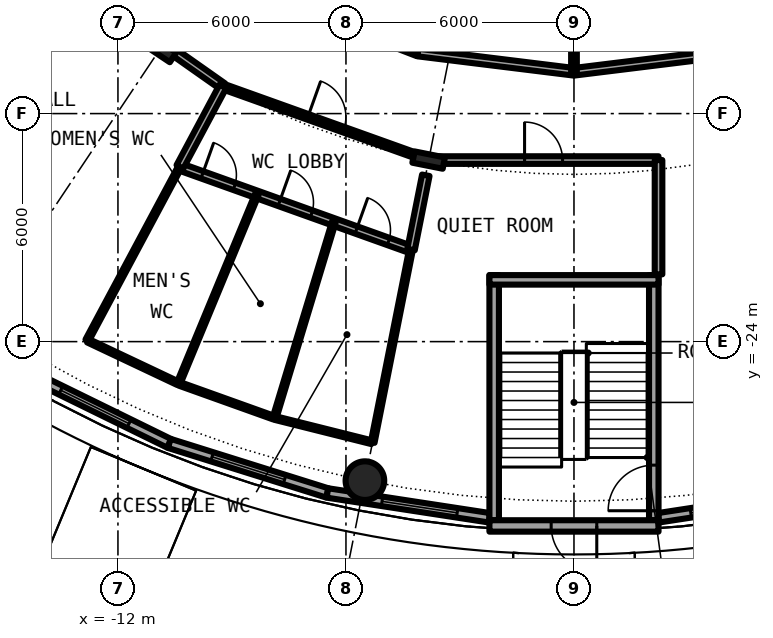
"""IFC4 building model, lengths in metres.
Left out: names, types, materials, properties, quantities, classifications, styles, units other than length and angle.
Written with IfcOpenShell. Run it as: python <this file> out.ifc"""

import sys

from ifc_helpers import new_model, si_unit, direction, frame, frame_2d, origin, origin_2d, place, context, subcontext, project, spatial, rectangle, hollow_circle, i_section, extrude, element, fill, save


model = new_model("IFC4")
c1 = context("Model", 3, precision=1e-05, world=origin(), true_north=direction((0.0, 1.0)))
c2 = subcontext(c1, "Body", "Model", "MODEL_VIEW")
j1 = project(units=[si_unit("LENGTHUNIT", "METRE"), si_unit("PLANEANGLEUNIT", "RADIAN")], contexts=[c1])
p1 = place(None, origin())
s1 = spatial("IfcSite", under=j1, at=p1, CompositionType="ELEMENT")
p2 = place(p1, origin())
s2 = spatial("IfcBuilding", under=s1, at=p2, CompositionType="ELEMENT")
p3 = place(p2, frame((0.0, 0.0, 9.6)))
s3 = spatial("IfcBuildingStorey", under=s2, at=p3, CompositionType="ELEMENT", Elevation=9.6)
p4 = place(p3, frame((-5.501, -27.658, 0.0), z_axis=(0.0, 0.0, 1.0), x_axis=(1.0, 0.0, 0.0)))
e1 = element("IfcColumn", 1, at=p4, inside=s3, PredefinedType="COLUMN", context=c2, shape_type="SweptSolid", body=[
    extrude(hollow_circle(Radius=0.508, WallThickness=0.05, at=origin_2d()), origin(), (0.0, 0.0, 1.0), 4.5),
])
for number, where, z_axis, x_axis in (
    (2, (-10.889, -16.297, 0.0), (0.0, 0.0, 1.0), (-0.556, -0.831, 0.0)),
    (3, (-3.824, -19.223, 0.0), (0.0, 0.0, 1.0), (-0.195, -0.981, 0.0)),
):
    element("IfcColumn", number, at=place(p3, frame(where, z_axis=z_axis, x_axis=x_axis)), inside=s3, PredefinedType="COLUMN", context=c2, shape_type="SweptSolid", body=[
        extrude(i_section(OverallWidth=0.303, OverallDepth=0.814, WebThickness=0.021, FlangeThickness=0.04, FilletRadius=0.03, at=origin_2d()), origin(), (0.0, 0.0, 1.0), 4.5),
    ])
p5 = place(p3, frame((-14.564, -24.759, 0.0), z_axis=(0.0, 0.0, 1.0), x_axis=(0.897938079481, -0.440121807478, 0.0)))
e4 = element("IfcWall", 4, at=p5, inside=s3, PredefinedType="SOLIDWALL", context=c2, shape_type="SweptSolid", body=[
    extrude(rectangle(XDim=4.36, YDim=0.25, at=frame_2d((2.18, 0.0))), origin(), (0.0, 0.0, 1.0), 4.05),
])
p6 = place(p5, frame((1.18, 0.0, 0.9)))
e5 = element("IfcOpeningElement", 5, at=p6, cuts=e4, PredefinedType="OPENING", context=c2, shape_type="SweptSolid", body=[
    extrude(rectangle(XDim=2.0, YDim=2.4, at=frame_2d((1.0, 1.2))), frame((0.0, 0.135, 0.0), z_axis=(0.0, -1.0, 0.0), x_axis=(1.0, 0.0, 0.0)), (0.0, 0.0, 1.0), 0.27),
])
p7 = place(p3, frame((-10.649, -26.678, 0.0), z_axis=(0.0, 0.0, 1.0), x_axis=(0.954219534331, -0.299107138498, 0.0)))
e6 = element("IfcWall", 6, at=p7, inside=s3, PredefinedType="SOLIDWALL", context=c2, shape_type="SweptSolid", body=[
    extrude(rectangle(XDim=4.359, YDim=0.25, at=frame_2d((2.18, 0.0))), origin(), (0.0, 0.0, 1.0), 4.05),
])
p8 = place(p7, frame((1.18, 0.0, 0.9)))
e7 = element("IfcOpeningElement", 7, at=p8, cuts=e6, PredefinedType="OPENING", context=c2, shape_type="SweptSolid", body=[
    extrude(rectangle(XDim=2.0, YDim=2.4, at=frame_2d((1.0, 1.2))), frame((0.0, 0.135, 0.0), z_axis=(0.0, -1.0, 0.0), x_axis=(1.0, 0.0, 0.0)), (0.0, 0.0, 1.0), 0.27),
])
p9 = place(p3, frame((-6.489, -27.982, 0.0), z_axis=(0.0, 0.0, 1.0), x_axis=(0.988472895049, -0.151397938406, 0.0)))
e8 = element("IfcWall", 8, at=p9, inside=s3, PredefinedType="SOLIDWALL", context=c2, shape_type="SweptSolid", body=[
    extrude(rectangle(XDim=4.314, YDim=0.25, at=frame_2d((2.157, 0.0))), origin(), (0.0, 0.0, 1.0), 4.05),
])
p10 = place(p9, frame((1.455, 0.0, 0.9)))
e9 = element("IfcOpeningElement", 9, at=p10, cuts=e8, PredefinedType="OPENING", context=c2, shape_type="SweptSolid", body=[
    extrude(rectangle(XDim=2.0, YDim=2.4, at=frame_2d((1.0, 1.2))), frame((0.0, 0.135, 0.0), z_axis=(0.0, -1.0, 0.0), x_axis=(1.0, 0.0, 0.0)), (0.0, 0.0, 1.0), 0.27),
])
p11 = place(p3, frame((2.225, -28.635, 0.0), z_axis=(0.0, 0.0, 1.0), x_axis=(0.988472895049, 0.151397938406, 0.0)))
e10 = element("IfcWall", 10, at=p11, inside=s3, PredefinedType="SOLIDWALL", context=c2, shape_type="SweptSolid", body=[
    extrude(rectangle(XDim=4.314, YDim=0.25, at=frame_2d((2.157, 0.0))), origin(), (0.0, 0.0, 1.0), 4.05),
])
p12 = place(p11, frame((0.859, 0.0, 0.9)))
e11 = element("IfcOpeningElement", 11, at=p12, cuts=e10, PredefinedType="OPENING", context=c2, shape_type="SweptSolid", body=[
    extrude(rectangle(XDim=2.0, YDim=2.4, at=frame_2d((1.0, 1.2))), frame((0.0, 0.135, 0.0), z_axis=(0.0, -1.0, 0.0), x_axis=(1.0, 0.0, 0.0)), (0.0, 0.0, 1.0), 0.27),
])
p13 = place(p3, frame((2.1, -28.7, 0.0), z_axis=(0.0, 0.0, 1.0), x_axis=(0.0, 1.0, 0.0)))
e12 = element("IfcWall", 12, at=p13, inside=s3, PredefinedType="SHEAR", context=c2, shape_type="SweptSolid", body=[
    extrude(rectangle(XDim=6.45, YDim=0.25, at=frame_2d((3.225, 0.0))), origin(), (0.0, 0.0, 1.0), 4.5),
])
p14 = place(p13, frame((0.25, 0.0, 0.0)))
e13 = element("IfcOpeningElement", 13, at=p14, cuts=e12, PredefinedType="OPENING", context=c2, shape_type="SweptSolid", body=[
    extrude(rectangle(XDim=1.2, YDim=2.3, at=frame_2d((0.6, 1.15))), frame((0.0, 0.135, 0.0), z_axis=(0.0, -1.0, 0.0), x_axis=(1.0, 0.0, 0.0)), (0.0, 0.0, 1.0), 0.27),
])
p15 = place(p3, frame((-2.1, -22.25, 0.0), z_axis=(0.0, 0.0, 1.0), x_axis=(0.0, -1.0, 0.0)))
e14 = element("IfcWall", 14, at=p15, inside=s3, PredefinedType="SHEAR", context=c2, shape_type="SweptSolid", body=[
    extrude(rectangle(XDim=6.45, YDim=0.25, at=frame_2d((3.225, 0.0))), origin(), (0.0, 0.0, 1.0), 4.5),
])
p16 = place(p3, frame((-2.225, -22.375, 0.0), z_axis=(0.0, 0.0, 1.0), x_axis=(1.0, 0.0, 0.0)))
e15 = element("IfcWall", 15, at=p16, inside=s3, PredefinedType="SHEAR", context=c2, shape_type="SweptSolid", body=[
    extrude(rectangle(XDim=4.45, YDim=0.25, at=frame_2d((2.225, 0.0))), origin(), (0.0, 0.0, 1.0), 4.5),
])
p17 = place(p3, frame((2.225, -28.85, 0.0), z_axis=(0.0, 0.0, 1.0), x_axis=(-1.0, 0.0, 0.0)))
e16 = element("IfcWall", 16, at=p17, inside=s3, PredefinedType="SHEAR", context=c2, shape_type="SweptSolid", body=[
    extrude(rectangle(XDim=4.45, YDim=0.3, at=frame_2d((2.225, 0.0))), origin(), (0.0, 0.0, 1.0), 4.5),
])
p18 = place(p17, frame((1.625, 0.0, 0.0)))
e17 = element("IfcOpeningElement", 17, at=p18, cuts=e16, PredefinedType="OPENING", context=c2, shape_type="SweptSolid", body=[
    extrude(rectangle(XDim=1.2, YDim=2.3, at=frame_2d((0.6, 1.15))), frame((0.0, 0.16, 0.0), z_axis=(0.0, -1.0, 0.0), x_axis=(1.0, 0.0, 0.0)), (0.0, 0.0, 1.0), 0.32),
])
p19 = place(p3, frame((-10.373, -19.401, 0.0), z_axis=(0.0, 0.0, 1.0), x_axis=(0.941534771306, -0.336915826909, 0.0)))
e18 = element("IfcWall", 18, at=p19, inside=s3, PredefinedType="PARTITIONING", context=c2, shape_type="SweptSolid", body=[
    extrude(rectangle(XDim=6.459, YDim=0.2, at=frame_2d((3.229, 0.0))), origin(), (0.0, 0.0, 1.0), 4.05),
])
p20 = place(p19, frame((0.627, 0.0, 0.0)))
e19 = element("IfcOpeningElement", 19, at=p20, cuts=e18, PredefinedType="OPENING", context=c2, shape_type="SweptSolid", body=[
    extrude(rectangle(XDim=0.9, YDim=2.3, at=frame_2d((0.45, 1.15))), frame((0.0, 0.11, 0.0), z_axis=(0.0, -1.0, 0.0), x_axis=(1.0, 0.0, 0.0)), (0.0, 0.0, 1.0), 0.22),
])
p21 = place(p19, frame((2.781, 0.0, 0.0)))
e20 = element("IfcOpeningElement", 20, at=p21, cuts=e18, PredefinedType="OPENING", context=c2, shape_type="SweptSolid", body=[
    extrude(rectangle(XDim=0.9, YDim=2.3, at=frame_2d((0.45, 1.15))), frame((0.0, 0.11, 0.0), z_axis=(0.0, -1.0, 0.0), x_axis=(1.0, 0.0, 0.0)), (0.0, 0.0, 1.0), 0.22),
])
p22 = place(p19, frame((4.933, 0.0, 0.0)))
e21 = element("IfcOpeningElement", 21, at=p22, cuts=e18, PredefinedType="OPENING", context=c2, shape_type="SweptSolid", body=[
    extrude(rectangle(XDim=0.9, YDim=2.3, at=frame_2d((0.45, 1.15))), frame((0.0, 0.11, 0.0), z_axis=(0.0, -1.0, 0.0), x_axis=(1.0, 0.0, 0.0)), (0.0, 0.0, 1.0), 0.22),
])
p23 = place(p3, frame((-10.687, -16.267, 0.0), z_axis=(0.0, 0.0, 1.0), x_axis=(0.817849682833, -0.575431921508, 0.0)))
e22 = element("IfcWall", 22, at=p23, inside=s3, PredefinedType="PARTITIONING", context=c2, shape_type="SweptSolid", body=[
    extrude(rectangle(XDim=1.771, YDim=0.2, at=frame_2d((0.885, 0.0))), origin(), (0.0, 0.0, 1.0), 3.63),
])
p24 = place(p3, frame((-9.239, -17.286, 0.0), z_axis=(0.0, 0.0, 1.0), x_axis=(0.941530584678, -0.336927526504, 0.0)))
e23 = element("IfcWall", 23, at=p24, inside=s3, PredefinedType="PARTITIONING", context=c2, shape_type="SweptSolid", body=[
    extrude(rectangle(XDim=5.598, YDim=0.15, at=frame_2d((2.799, 0.0))), origin(), (0.0, 0.0, 1.0), 3.63),
])
p25 = place(p24, frame((2.376, 0.0, 0.0)))
e24 = element("IfcOpeningElement", 24, at=p25, cuts=e23, PredefinedType="OPENING", context=c2, shape_type="SweptSolid", body=[
    extrude(rectangle(XDim=1.0, YDim=2.3, at=frame_2d((0.5, 1.15))), frame((0.0, 0.085, 0.0), z_axis=(0.0, -1.0, 0.0), x_axis=(1.0, 0.0, 0.0)), (0.0, 0.0, 1.0), 0.17),
])
p26 = place(p3, frame((-3.669, -19.223, 0.0), z_axis=(0.0, 0.0, 1.0), x_axis=(1.0, 0.0, 0.0)))
e25 = element("IfcWall", 25, at=p26, inside=s3, PredefinedType="PARTITIONING", context=c2, shape_type="SweptSolid", body=[
    extrude(rectangle(XDim=5.894, YDim=0.2, at=frame_2d((2.947, 0.0))), origin(), (0.0, 0.0, 1.0), 3.63),
])
p27 = place(p26, frame((2.369, 0.0, 0.0)))
e26 = element("IfcOpeningElement", 26, at=p27, cuts=e25, PredefinedType="OPENING", context=c2, shape_type="SweptSolid", body=[
    extrude(rectangle(XDim=1.0, YDim=2.3, at=frame_2d((0.5, 1.15))), frame((0.0, 0.11, 0.0), z_axis=(0.0, -1.0, 0.0), x_axis=(1.0, 0.0, 0.0)), (0.0, 0.0, 1.0), 0.22),
])
p28 = place(p3, frame((-7.967, -14.904, 0.0), z_axis=(0.0, 0.0, 1.0), x_axis=(0.932943640288, -0.360022449363, 0.0)))
e27 = element("IfcWall", 27, at=p28, inside=s3, PredefinedType="PARTITIONING", context=c2, shape_type="SweptSolid", body=[
    extrude(rectangle(XDim=4.139, YDim=0.2, at=frame_2d((2.069, 0.0))), origin(), (0.0, 0.0, 1.0), 4.05),
])
p29 = place(p28, frame((1.569, 0.0, 0.0)))
e28 = element("IfcOpeningElement", 28, at=p29, cuts=e27, PredefinedType="OPENING", context=c2, shape_type="SweptSolid", body=[
    extrude(rectangle(XDim=1.0, YDim=2.3, at=frame_2d((0.5, 1.15))), frame((0.0, 0.11, 0.0), z_axis=(0.0, -1.0, 0.0), x_axis=(1.0, 0.0, 0.0)), (0.0, 0.0, 1.0), 0.22),
])
for number, where, z_axis, x_axis in (
    (29, (-4.106, -16.394, 0.0), (0.0, 0.0, 1.0), (0.992, -0.122, 0.0)),
    (30, (0.0, -16.9, 0.0), (0.0, 0.0, 1.0), (0.992, 0.122, 0.0)),
):
    element("IfcWall", number, at=place(p3, frame(where, z_axis=z_axis, x_axis=x_axis)), inside=s3, PredefinedType="PARTITIONING", context=c2, shape_type="SweptSolid", body=[
        extrude(rectangle(XDim=4.137, YDim=0.2, at=frame_2d((2.068, 0.0))), origin(), (0.0, 0.0, 1.0), 4.05),
    ])
p30 = place(p3, frame((2.225, -22.23, 0.0), z_axis=(0.0, 0.0, 1.0), x_axis=(0.0, 1.0, 0.0)))
e31 = element("IfcWall", 31, at=p30, inside=s3, PredefinedType="PARTITIONING", context=c2, shape_type="SweptSolid", body=[
    extrude(rectangle(XDim=3.007, YDim=0.2, at=frame_2d((1.503, 0.0))), origin(), (0.0, 0.0, 1.0), 4.05),
])
p31 = place(p3, frame((-12.81, -23.966, 0.0), z_axis=(0.0, 0.0, 1.0), x_axis=(0.471464572183, 0.88188500224, 0.0)))
e32 = element("IfcWall", 32, at=p31, inside=s3, PredefinedType="PARTITIONING", context=c2, shape_type="SweptSolid", body=[
    extrude(rectangle(XDim=5.175, YDim=0.1, at=frame_2d((2.588, 0.0))), origin(), (0.0, 0.0, 1.0), 4.05),
])
p32 = place(p3, frame((-10.407, -25.103, 0.0), z_axis=(0.0, 0.0, 1.0), x_axis=(0.382973519041, 0.923759321313, 0.0)))
e33 = element("IfcWall", 33, at=p32, inside=s3, PredefinedType="PARTITIONING", context=c2, shape_type="SweptSolid", body=[
    extrude(rectangle(XDim=5.387, YDim=0.1, at=frame_2d((2.693, 0.0))), origin(), (0.0, 0.0, 1.0), 4.05),
])
p33 = place(p3, frame((-10.37, -19.402, 0.0), z_axis=(0.0, 0.0, 1.0), x_axis=(0.471385457832, 0.881927293004, 0.0)))
e34 = element("IfcWall", 34, at=p33, inside=s3, PredefinedType="PARTITIONING", context=c2, shape_type="SweptSolid", body=[
    extrude(rectangle(XDim=2.399, YDim=0.2, at=frame_2d((1.2, 0.0))), origin(), (0.0, 0.0, 1.0), 4.05),
])
p34 = place(p3, frame((-7.88, -26.007, 0.0), z_axis=(0.0, 0.0, 1.0), x_axis=(0.289945753839, 0.957043081492, 0.0)))
e35 = element("IfcWall", 35, at=p34, inside=s3, PredefinedType="PARTITIONING", context=c2, shape_type="SweptSolid", body=[
    extrude(rectangle(XDim=5.386, YDim=0.1, at=frame_2d((2.693, 0.0))), origin(), (0.0, 0.0, 1.0), 4.05),
])
p35 = place(p3, frame((-5.297, -26.654, 0.0), z_axis=(0.0, 0.0, 1.0), x_axis=(0.194963902417, 0.980810418355, 0.0)))
e36 = element("IfcWall", 36, at=p35, inside=s3, PredefinedType="PARTITIONING", context=c2, shape_type="SweptSolid", body=[
    extrude(rectangle(XDim=5.176, YDim=0.1, at=frame_2d((2.588, 0.0))), origin(), (0.0, 0.0, 1.0), 4.05),
])
p36 = place(p3, frame((-4.288, -21.578, 0.0), z_axis=(0.0, 0.0, 1.0), x_axis=(0.195244514504, 0.98075459701, 0.0)))
e37 = element("IfcWall", 37, at=p36, inside=s3, PredefinedType="PARTITIONING", context=c2, shape_type="SweptSolid", body=[
    extrude(rectangle(XDim=1.993, YDim=0.2, at=frame_2d((0.997, 0.0))), origin(), (0.0, 0.0, 1.0), 4.05),
])
p37 = place(p3, frame((0.0, -16.9, 0.0), z_axis=(0.0, 0.0, 1.0), x_axis=(0.0, 1.0, 0.0)))
e38 = element("IfcWall", 38, at=p37, inside=s3, PredefinedType="PARTITIONING", context=c2, shape_type="SweptSolid", body=[
    extrude(rectangle(XDim=9.18, YDim=0.15, at=frame_2d((4.59, 0.0))), origin(), (0.0, 0.0, 1.0), 4.05),
])
p38 = place(p3, frame((-10.425, -25.094, 0.0), z_axis=(0.0, 0.0, 1.0), x_axis=(-0.904075542006, 0.427372687882, 0.0)))
e39 = element("IfcWall", 39, at=p38, inside=s3, PredefinedType="PARTITIONING", context=c2, shape_type="SweptSolid", body=[
    extrude(rectangle(XDim=2.618, YDim=0.1, at=frame_2d((1.309, 0.0))), origin(), (0.0, 0.0, 1.0), 4.05),
])
p39 = place(p3, frame((-7.899, -26.001, 0.0), z_axis=(0.0, 0.0, 1.0), x_axis=(-0.94150976765, 0.336985693198, 0.0)))
e40 = element("IfcWall", 40, at=p39, inside=s3, PredefinedType="PARTITIONING", context=c2, shape_type="SweptSolid", body=[
    extrude(rectangle(XDim=2.644, YDim=0.1, at=frame_2d((1.322, 0.0))), origin(), (0.0, 0.0, 1.0), 4.05),
])
p40 = place(p3, frame((-5.321, -26.648, 0.0), z_axis=(0.0, 0.0, 1.0), x_axis=(-0.970054682641, 0.242886625171, 0.0)))
e41 = element("IfcWall", 41, at=p40, inside=s3, PredefinedType="PARTITIONING", context=c2, shape_type="SweptSolid", body=[
    extrude(rectangle(XDim=2.618, YDim=0.1, at=frame_2d((1.309, 0.0))), origin(), (0.0, 0.0, 1.0), 4.05),
])
p41 = place(p6, origin())
e42 = element("IfcWindow", 42, at=p41, inside=s3, PartitioningType="SINGLE_PANEL", PredefinedType="WINDOW", context=c2, shape_type="SweptSolid", body=[
    extrude(rectangle(XDim=2.0, YDim=2.4, at=frame_2d((1.0, 1.2))), frame((0.0, 0.03, 0.0), z_axis=(0.0, -1.0, 0.0), x_axis=(1.0, 0.0, 0.0)), (0.0, 0.0, 1.0), 0.06),
])
fill(e5, e42)
p42 = place(p8, origin())
e43 = element("IfcWindow", 43, at=p42, inside=s3, PartitioningType="SINGLE_PANEL", PredefinedType="WINDOW", context=c2, shape_type="SweptSolid", body=[
    extrude(rectangle(XDim=2.0, YDim=2.4, at=frame_2d((1.0, 1.2))), frame((0.0, 0.03, 0.0), z_axis=(0.0, -1.0, 0.0), x_axis=(1.0, 0.0, 0.0)), (0.0, 0.0, 1.0), 0.06),
])
fill(e7, e43)
p43 = place(p10, origin())
e44 = element("IfcWindow", 44, at=p43, inside=s3, PartitioningType="SINGLE_PANEL", PredefinedType="WINDOW", context=c2, shape_type="SweptSolid", body=[
    extrude(rectangle(XDim=2.0, YDim=2.4, at=frame_2d((1.0, 1.2))), frame((0.0, 0.03, 0.0), z_axis=(0.0, -1.0, 0.0), x_axis=(1.0, 0.0, 0.0)), (0.0, 0.0, 1.0), 0.06),
])
fill(e9, e44)
p44 = place(p12, origin())
e45 = element("IfcWindow", 45, at=p44, inside=s3, PartitioningType="SINGLE_PANEL", PredefinedType="WINDOW", context=c2, shape_type="SweptSolid", body=[
    extrude(rectangle(XDim=2.0, YDim=2.4, at=frame_2d((1.0, 1.2))), frame((0.0, 0.03, 0.0), z_axis=(0.0, -1.0, 0.0), x_axis=(1.0, 0.0, 0.0)), (0.0, 0.0, 1.0), 0.06),
])
fill(e11, e45)
p45 = place(p14, origin())
e46 = element("IfcDoor", 46, at=p45, inside=s3, OperationType="SINGLE_SWING_RIGHT", PredefinedType="DOOR", context=c2, shape_type="SweptSolid", body=[
    extrude(rectangle(XDim=1.2, YDim=2.3, at=frame_2d((0.6, 1.15))), frame((0.0, 0.025, 0.0), z_axis=(0.0, -1.0, 0.0), x_axis=(1.0, 0.0, 0.0)), (0.0, 0.0, 1.0), 0.05),
])
fill(e13, e46)
p46 = place(p18, origin())
e47 = element("IfcDoor", 47, at=p46, inside=s3, OperationType="SINGLE_SWING_LEFT", PredefinedType="DOOR", context=c2, shape_type="SweptSolid", body=[
    extrude(rectangle(XDim=1.2, YDim=2.3, at=frame_2d((0.6, 1.15))), frame((0.0, 0.025, 0.0), z_axis=(0.0, -1.0, 0.0), x_axis=(1.0, 0.0, 0.0)), (0.0, 0.0, 1.0), 0.05),
])
fill(e17, e47)
p47 = place(p25, origin())
e48 = element("IfcDoor", 48, at=p47, inside=s3, OperationType="SINGLE_SWING_RIGHT", PredefinedType="DOOR", context=c2, shape_type="SweptSolid", body=[
    extrude(rectangle(XDim=1.0, YDim=2.3, at=frame_2d((0.5, 1.15))), frame((0.0, 0.025, 0.0), z_axis=(0.0, -1.0, 0.0), x_axis=(1.0, 0.0, 0.0)), (0.0, 0.0, 1.0), 0.05),
])
fill(e24, e48)
p48 = place(p20, origin())
e49 = element("IfcDoor", 49, at=p48, inside=s3, OperationType="SINGLE_SWING_LEFT", PredefinedType="DOOR", context=c2, shape_type="SweptSolid", body=[
    extrude(rectangle(XDim=0.9, YDim=2.3, at=frame_2d((0.45, 1.15))), frame((0.0, 0.025, 0.0), z_axis=(0.0, -1.0, 0.0), x_axis=(1.0, 0.0, 0.0)), (0.0, 0.0, 1.0), 0.05),
])
fill(e19, e49)
p49 = place(p21, origin())
e50 = element("IfcDoor", 50, at=p49, inside=s3, OperationType="SINGLE_SWING_RIGHT", PredefinedType="DOOR", context=c2, shape_type="SweptSolid", body=[
    extrude(rectangle(XDim=0.9, YDim=2.3, at=frame_2d((0.45, 1.15))), frame((0.0, 0.025, 0.0), z_axis=(0.0, -1.0, 0.0), x_axis=(1.0, 0.0, 0.0)), (0.0, 0.0, 1.0), 0.05),
])
fill(e20, e50)
p50 = place(p22, origin())
e51 = element("IfcDoor", 51, at=p50, inside=s3, OperationType="SINGLE_SWING_RIGHT", PredefinedType="DOOR", context=c2, shape_type="SweptSolid", body=[
    extrude(rectangle(XDim=0.9, YDim=2.3, at=frame_2d((0.45, 1.15))), frame((0.0, 0.025, 0.0), z_axis=(0.0, -1.0, 0.0), x_axis=(1.0, 0.0, 0.0)), (0.0, 0.0, 1.0), 0.05),
])
fill(e21, e51)
p51 = place(p27, origin())
e52 = element("IfcDoor", 52, at=p51, inside=s3, OperationType="SINGLE_SWING_LEFT", PredefinedType="DOOR", context=c2, shape_type="SweptSolid", body=[
    extrude(rectangle(XDim=1.0, YDim=2.3, at=frame_2d((0.5, 1.15))), frame((0.0, 0.025, 0.0), z_axis=(0.0, -1.0, 0.0), x_axis=(1.0, 0.0, 0.0)), (0.0, 0.0, 1.0), 0.05),
])
fill(e26, e52)
save(model, sys.argv[1])
